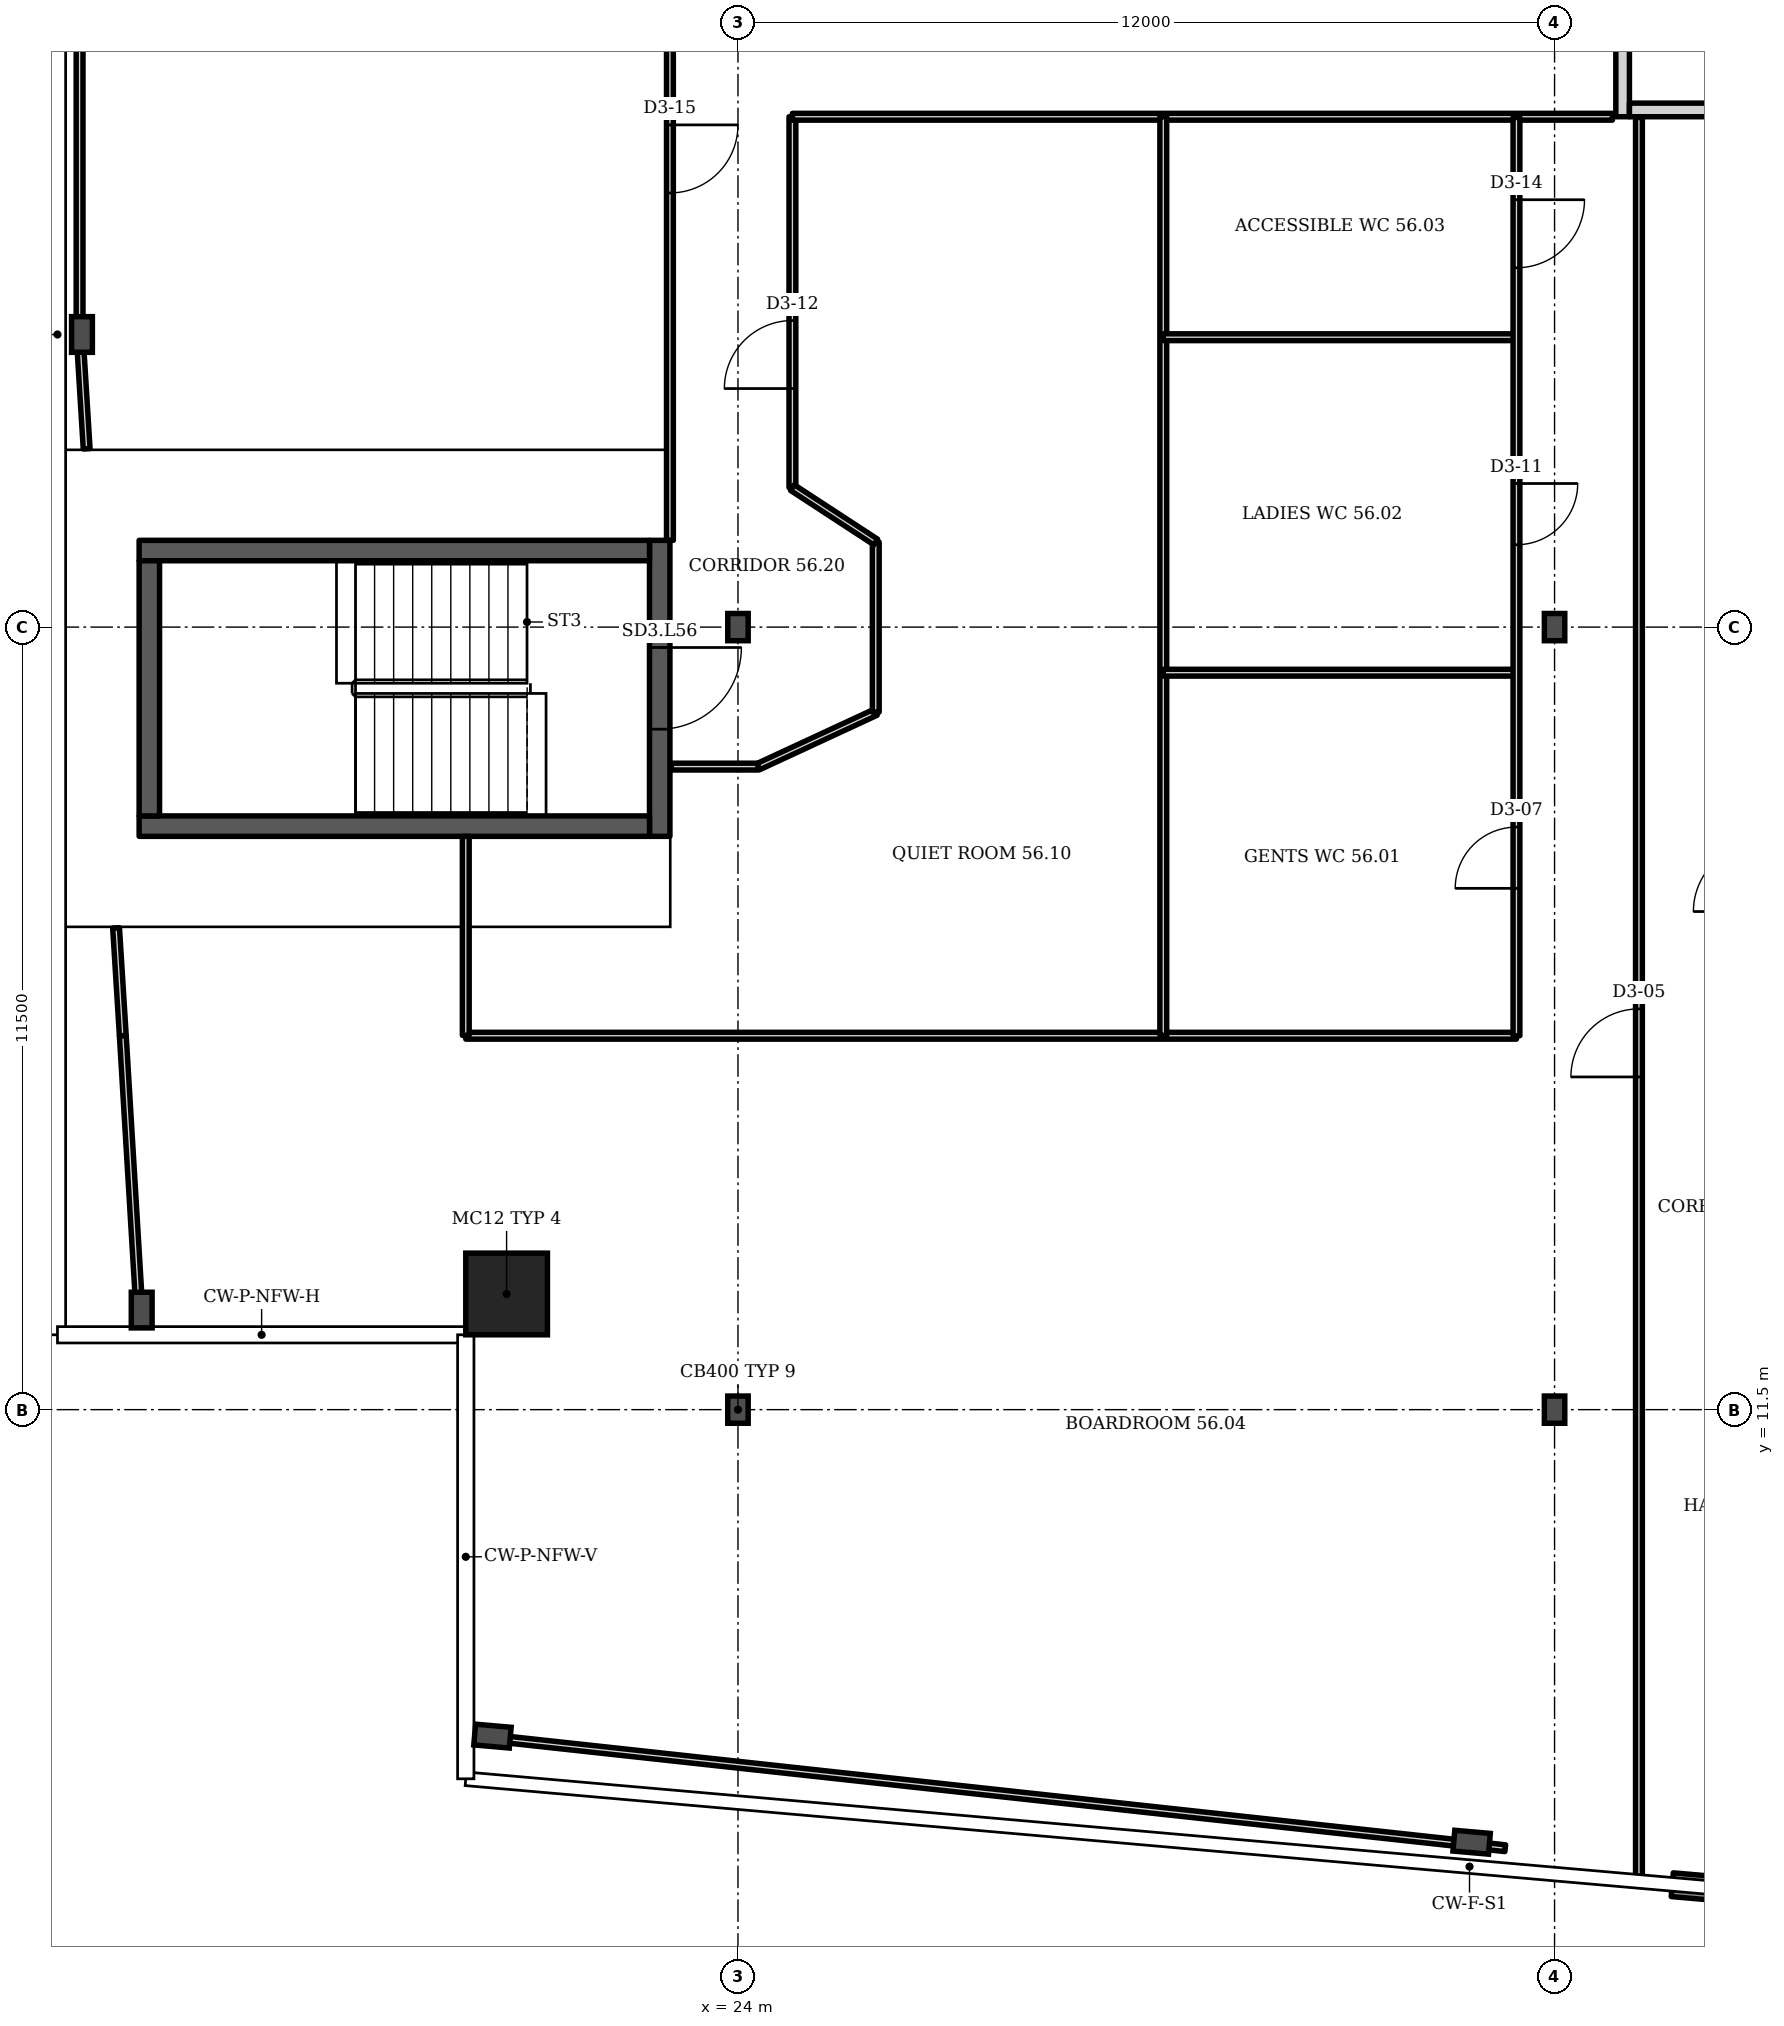
"""IFC4 building model, lengths in metres.
Left out: names, types, materials, properties, quantities, classifications, styles, units other than length and angle.
Written with IfcOpenShell. Run it as: python <this file> out.ifc"""

import sys

from ifc_helpers import new_model, si_unit, direction, frame, frame_2d, origin, origin_2d, place, context, subcontext, project, spatial, rectangle, i_section, extrude, element, fill, save


model = new_model("IFC4")
c1 = context("Model", 3, precision=1e-05, world=origin(), true_north=direction((0.0, 1.0)))
c2 = subcontext(c1, "Body", "Model", "MODEL_VIEW")
j1 = project(units=[si_unit("LENGTHUNIT", "METRE"), si_unit("PLANEANGLEUNIT", "RADIAN")], contexts=[c1])
p1 = place(None, origin())
s1 = spatial("IfcSite", under=j1, at=p1, CompositionType="ELEMENT")
p2 = place(p1, origin())
s2 = spatial("IfcBuilding", under=s1, at=p2, CompositionType="ELEMENT")
p3 = place(p2, frame((0.0, 0.0, 225.1)))
s3 = spatial("IfcBuildingStorey", under=s2, at=p3, CompositionType="ELEMENT", Elevation=225.1)
p4 = place(p3, frame((20.6, 13.2, 0.0), z_axis=(0.0, 0.0, 1.0), x_axis=(1.0, 0.0, 0.0)))
e1 = element("IfcColumn", 1, at=p4, inside=s3, PredefinedType="COLUMN", context=c2, shape_type="SweptSolid", body=[
    extrude(rectangle(XDim=1.2, YDim=1.2, at=origin_2d()), origin(), (0.0, 0.0, 1.0), 3.6),
])
for number, where, z_axis, x_axis in (
    (2, (20.392, 6.703, 0.0), (0.0, 0.0, 1.0), (-0.087, -0.996, 0.0)),
    (3, (34.781, 5.143, 0.0), (0.0, 0.0, 1.0), (-0.087, -0.996, 0.0)),
    (4, (14.36, 27.3, 0.0), (0.0, 0.0, 1.0), (-1.0, 0.0, 0.0)),
    (5, (15.238, 12.963, 0.0), (0.0, 0.0, 1.0), (-1.0, 0.0, 0.0)),
):
    element("IfcColumn", number, at=place(p3, frame(where, z_axis=z_axis, x_axis=x_axis)), inside=s3, PredefinedType="COLUMN", context=c2, shape_type="SweptSolid", body=[
        extrude(i_section(OverallWidth=0.306, OverallDepth=0.524, WebThickness=0.021, FlangeThickness=0.04, FilletRadius=0.027, at=origin_2d()), origin(), (0.0, 0.0, 1.0), 3.6),
    ])
for number, where, z_axis, x_axis in (
    (6, (24.0, 11.5, 0.0), (0.0, 0.0, 1.0), (1.0, 0.0, 0.0)),
    (7, (36.0, 11.5, 0.0), (0.0, 0.0, 1.0), (1.0, 0.0, 0.0)),
    (8, (24.0, 23.0, 0.0), (0.0, 0.0, 1.0), (1.0, 0.0, 0.0)),
    (9, (36.0, 23.0, 0.0), (0.0, 0.0, 1.0), (1.0, 0.0, 0.0)),
):
    element("IfcColumn", number, at=place(p3, frame(where, z_axis=z_axis, x_axis=x_axis)), inside=s3, PredefinedType="COLUMN", context=c2, shape_type="SweptSolid", body=[
        extrude(i_section(OverallWidth=0.3, OverallDepth=0.4, WebThickness=0.013, FlangeThickness=0.024, FilletRadius=0.027, at=origin_2d()), origin(), (0.0, 0.0, 1.0), 3.6),
    ])
p5 = place(p3, frame((37.729, 4.519, 0.0), z_axis=(0.0, 0.0, 1.0), x_axis=(0.99619, -0.087167, 0.0)))
e10 = element("IfcWall", 10, at=p5, inside=s3, PredefinedType="SOLIDWALL", context=c2, shape_type="SweptSolid", body=[
    extrude(rectangle(XDim=11.831, YDim=0.35, at=frame_2d((5.915, 0.0))), origin(), (0.0, 0.0, 1.0), 1.0),
])
p6 = place(p3, frame((37.0, 30.5, 0.0), z_axis=(0.0, 0.0, 1.0), x_axis=(0.0, 1.0, 0.0)))
e11 = element("IfcWall", 11, at=p6, inside=s3, PredefinedType="PARTITIONING", context=c2, shape_type="SweptSolid", body=[
    extrude(rectangle(XDim=3.5, YDim=0.2, at=frame_2d((1.75, 0.0))), origin(), (0.0, 0.0, 1.0), 3.2),
])
p7 = place(p6, frame((1.2, 0.0, 0.0)))
e12 = element("IfcOpeningElement", 12, at=p7, cuts=e11, PredefinedType="OPENING", context=c2, shape_type="SweptSolid", body=[
    extrude(rectangle(XDim=1.1, YDim=2.1, at=frame_2d((0.55, 1.05))), frame((0.0, 0.11, 0.0), z_axis=(0.0, -1.0, 0.0), x_axis=(1.0, 0.0, 0.0)), (0.0, 0.0, 1.0), 0.22),
])
p8 = place(p3, frame((37.1, 30.6, 0.0), z_axis=(0.0, 0.0, 1.0), x_axis=(1.0, 0.0, 0.0)))
e13 = element("IfcWall", 13, at=p8, inside=s3, PredefinedType="PARTITIONING", context=c2, shape_type="SweptSolid", body=[
    extrude(rectangle(XDim=2.8, YDim=0.2, at=frame_2d((1.4, 0.0))), origin(), (0.0, 0.0, 1.0), 3.2),
])
p9 = place(p3, frame((22.85, 19.925, 0.0), z_axis=(0.0, 0.0, 1.0), x_axis=(0.0, 1.0, 0.0)))
e14 = element("IfcWall", 14, at=p9, inside=s3, PredefinedType="SHEAR", context=c2, shape_type="SweptSolid", body=[
    extrude(rectangle(XDim=4.35, YDim=0.3, at=frame_2d((2.175, 0.0))), origin(), (0.0, 0.0, 1.0), 3.2),
])
p10 = place(p9, frame((1.575, 0.0, 0.0)))
e15 = element("IfcOpeningElement", 15, at=p10, cuts=e14, PredefinedType="OPENING", context=c2, shape_type="SweptSolid", body=[
    extrude(rectangle(XDim=1.2, YDim=2.1, at=frame_2d((0.6, 1.05))), frame((0.0, 0.16, 0.0), z_axis=(0.0, -1.0, 0.0), x_axis=(1.0, 0.0, 0.0)), (0.0, 0.0, 1.0), 0.32),
])
p11 = place(p3, frame((14.325, 27.3, 0.0), z_axis=(0.0, 0.0, 1.0), x_axis=(0.0, 1.0, 0.0)))
e16 = element("IfcWall", 16, at=p11, inside=s3, PredefinedType="PARTITIONING", context=c2, shape_type="SweptSolid", body=[
    extrude(rectangle(XDim=14.68, YDim=0.1, at=frame_2d((7.34, 0.0))), origin(), (0.0, 0.0, 1.0), 2.58),
])
p12 = place(p3, frame((14.429, 25.62, 0.0), z_axis=(0.0, 0.0, 1.0), x_axis=(-0.061647, 0.998101, 0.0)))
e17 = element("IfcWall", 17, at=p12, inside=s3, PredefinedType="PARTITIONING", context=c2, shape_type="SweptSolid", body=[
    extrude(rectangle(XDim=1.683, YDim=0.1, at=frame_2d((0.842, 0.0))), origin(), (0.0, 0.0, 1.0), 3.2),
])
p13 = place(p3, frame((14.96, 16.995, 0.0), z_axis=(0.0, 0.0, 1.0), x_axis=(-0.062263, 0.998056, 0.0)))
e18 = element("IfcWall", 18, at=p13, inside=s3, PredefinedType="PARTITIONING", context=c2, shape_type="SweptSolid", body=[
    extrude(rectangle(XDim=1.588, YDim=0.1, at=frame_2d((0.794, 0.0))), origin(), (0.0, 0.0, 1.0), 3.2),
])
p14 = place(p3, frame((15.224, 12.62, 0.0), z_axis=(0.0, 0.0, 1.0), x_axis=(-0.060214, 0.998182, 0.0)))
e19 = element("IfcWall", 19, at=p14, inside=s3, PredefinedType="PARTITIONING", context=c2, shape_type="SweptSolid", body=[
    extrude(rectangle(XDim=4.383, YDim=0.1, at=frame_2d((2.191, 0.0))), origin(), (0.0, 0.0, 1.0), 3.2),
])
p15 = place(p3, frame((20.0, 16.995, 0.0), z_axis=(0.0, 0.0, 1.0), x_axis=(1.0, 0.0, 0.0)))
e20 = element("IfcWall", 20, at=p15, inside=s3, PredefinedType="PARTITIONING", context=c2, shape_type="SweptSolid", body=[
    extrude(rectangle(XDim=15.44, YDim=0.1, at=frame_2d((7.72, 0.0))), origin(), (0.0, 0.0, 1.0), 3.2),
])
p16 = place(p3, frame((20.0, 17.0, 0.0), z_axis=(0.0, 0.0, 1.0), x_axis=(0.0, 1.0, 0.0)))
e21 = element("IfcWall", 21, at=p16, inside=s3, PredefinedType="PARTITIONING", context=c2, shape_type="SweptSolid", body=[
    extrude(rectangle(XDim=2.925, YDim=0.1, at=frame_2d((1.462, 0.0))), origin(), (0.0, 0.0, 1.0), 3.2),
])
p17 = place(p3, frame((23.0, 24.275, 0.0), z_axis=(0.0, 0.0, 1.0), x_axis=(0.0, 1.0, 0.0)))
e22 = element("IfcWall", 22, at=p17, inside=s3, PredefinedType="PARTITIONING", context=c2, shape_type="SweptSolid", body=[
    extrude(rectangle(XDim=9.705, YDim=0.1, at=frame_2d((4.853, 0.0))), origin(), (0.0, 0.0, 1.0), 3.2),
])
p18 = place(p17, frame((5.105, 0.0, 0.0)))
e23 = element("IfcOpeningElement", 23, at=p18, cuts=e22, PredefinedType="OPENING", context=c2, shape_type="SweptSolid", body=[
    extrude(rectangle(XDim=1.0, YDim=2.1, at=frame_2d((0.5, 1.05))), frame((0.0, 0.06, 0.0), z_axis=(0.0, -1.0, 0.0), x_axis=(1.0, 0.0, 0.0)), (0.0, 0.0, 1.0), 0.12),
])
p19 = place(p3, frame((23.02, 20.95, 0.0), z_axis=(0.0, 0.0, 1.0), x_axis=(1.0, 0.0, 0.0)))
e24 = element("IfcWall", 24, at=p19, inside=s3, PredefinedType="PARTITIONING", context=c2, shape_type="SweptSolid", body=[
    extrude(rectangle(XDim=1.28, YDim=0.1, at=frame_2d((0.64, 0.0))), origin(), (0.0, 0.0, 1.0), 3.2),
])
p20 = place(p3, frame((24.3, 20.95, 0.0), z_axis=(0.0, 0.0, 1.0), x_axis=(0.907168, 0.420777, 0.0)))
e25 = element("IfcWall", 25, at=p20, inside=s3, PredefinedType="PARTITIONING", context=c2, shape_type="SweptSolid", body=[
    extrude(rectangle(XDim=1.901, YDim=0.1, at=frame_2d((0.951, 0.0))), origin(), (0.0, 0.0, 1.0), 3.2),
])
p21 = place(p3, frame((24.8, 25.05, 0.0), z_axis=(0.0, 0.0, 1.0), x_axis=(0.0, 1.0, 0.0)))
e26 = element("IfcWall", 26, at=p21, inside=s3, PredefinedType="PARTITIONING", context=c2, shape_type="SweptSolid", body=[
    extrude(rectangle(XDim=5.45, YDim=0.1, at=frame_2d((2.725, 0.0))), origin(), (0.0, 0.0, 1.0), 3.2),
])
p22 = place(p21, frame((1.455, 0.0, 0.0)))
e27 = element("IfcOpeningElement", 27, at=p22, cuts=e26, PredefinedType="OPENING", context=c2, shape_type="SweptSolid", body=[
    extrude(rectangle(XDim=1.0, YDim=2.1, at=frame_2d((0.5, 1.05))), frame((0.0, 0.06, 0.0), z_axis=(0.0, -1.0, 0.0), x_axis=(1.0, 0.0, 0.0)), (0.0, 0.0, 1.0), 0.12),
])
p23 = place(p3, frame((24.8, 30.5, 0.0), z_axis=(0.0, 0.0, 1.0), x_axis=(1.0, 0.0, 0.0)))
e28 = element("IfcWall", 28, at=p23, inside=s3, PredefinedType="PARTITIONING", context=c2, shape_type="SweptSolid", body=[
    extrude(rectangle(XDim=12.05, YDim=0.1, at=frame_2d((6.025, 0.0))), origin(), (0.0, 0.0, 1.0), 3.2),
])
p24 = place(p3, frame((26.025, 21.75, 0.0), z_axis=(0.0, 0.0, 1.0), x_axis=(0.0, 1.0, 0.0)))
e29 = element("IfcWall", 29, at=p24, inside=s3, PredefinedType="PARTITIONING", context=c2, shape_type="SweptSolid", body=[
    extrude(rectangle(XDim=2.5, YDim=0.1, at=frame_2d((1.25, 0.0))), origin(), (0.0, 0.0, 1.0), 3.2),
])
p25 = place(p3, frame((26.025, 24.25, 0.0), z_axis=(0.0, 0.0, 1.0), x_axis=(-0.837222, 0.546856, 0.0)))
e30 = element("IfcWall", 30, at=p25, inside=s3, PredefinedType="PARTITIONING", context=c2, shape_type="SweptSolid", body=[
    extrude(rectangle(XDim=1.463, YDim=0.1, at=frame_2d((0.731, 0.0))), origin(), (0.0, 0.0, 1.0), 3.2),
])
p26 = place(p3, frame((30.25, 17.0, 0.0), z_axis=(0.0, 0.0, 1.0), x_axis=(0.0, 1.0, 0.0)))
e31 = element("IfcWall", 31, at=p26, inside=s3, PredefinedType="PARTITIONING", context=c2, shape_type="SweptSolid", body=[
    extrude(rectangle(XDim=13.5, YDim=0.1, at=frame_2d((6.75, 0.0))), origin(), (0.0, 0.0, 1.0), 3.2),
])
for number, where, z_axis, x_axis in (
    (32, (30.25, 22.33, 0.0), (0.0, 0.0, 1.0), (1.0, 0.0, 0.0)),
    (33, (30.25, 27.26, 0.0), (0.0, 0.0, 1.0), (1.0, 0.0, 0.0)),
):
    element("IfcWall", number, at=place(p3, frame(where, z_axis=z_axis, x_axis=x_axis)), inside=s3, PredefinedType="PARTITIONING", context=c2, shape_type="SweptSolid", body=[
        extrude(rectangle(XDim=5.19, YDim=0.1, at=frame_2d((2.595, 0.0))), origin(), (0.0, 0.0, 1.0), 3.2),
    ])
p27 = place(p3, frame((35.275, 5.055, 0.0), z_axis=(0.0, 0.0, 1.0), x_axis=(-0.994128, 0.108228, 0.0)))
e34 = element("IfcWall", 34, at=p27, inside=s3, PredefinedType="PARTITIONING", context=c2, shape_type="SweptSolid", body=[
    extrude(rectangle(XDim=15.335, YDim=0.1, at=frame_2d((7.667, 0.0))), origin(), (0.0, 0.0, 1.0), 2.58),
])
p28 = place(p3, frame((35.44, 16.995, 0.0), z_axis=(0.0, 0.0, 1.0), x_axis=(0.0, 1.0, 0.0)))
e35 = element("IfcWall", 35, at=p28, inside=s3, PredefinedType="PARTITIONING", context=c2, shape_type="SweptSolid", body=[
    extrude(rectangle(XDim=13.495, YDim=0.1, at=frame_2d((6.748, 0.0))), origin(), (0.0, 0.0, 1.0), 3.2),
])
p29 = place(p28, frame((2.166, 0.0, 0.0)))
e36 = element("IfcOpeningElement", 36, at=p29, cuts=e35, PredefinedType="OPENING", context=c2, shape_type="SweptSolid", body=[
    extrude(rectangle(XDim=0.9, YDim=2.1, at=frame_2d((0.45, 1.05))), frame((0.0, 0.06, 0.0), z_axis=(0.0, -1.0, 0.0), x_axis=(1.0, 0.0, 0.0)), (0.0, 0.0, 1.0), 0.12),
])
p30 = place(p28, frame((7.215, 0.0, 0.0)))
e37 = element("IfcOpeningElement", 37, at=p30, cuts=e35, PredefinedType="OPENING", context=c2, shape_type="SweptSolid", body=[
    extrude(rectangle(XDim=0.9, YDim=2.1, at=frame_2d((0.45, 1.05))), frame((0.0, 0.06, 0.0), z_axis=(0.0, -1.0, 0.0), x_axis=(1.0, 0.0, 0.0)), (0.0, 0.0, 1.0), 0.12),
])
p31 = place(p28, frame((11.285, 0.0, 0.0)))
e38 = element("IfcOpeningElement", 38, at=p31, cuts=e35, PredefinedType="OPENING", context=c2, shape_type="SweptSolid", body=[
    extrude(rectangle(XDim=1.0, YDim=2.1, at=frame_2d((0.5, 1.05))), frame((0.0, 0.06, 0.0), z_axis=(0.0, -1.0, 0.0), x_axis=(1.0, 0.0, 0.0)), (0.0, 0.0, 1.0), 0.12),
])
p32 = place(p3, frame((37.24, 4.587, 0.0), z_axis=(0.0, 0.0, 1.0), x_axis=(0.0, 1.0, 0.0)))
e39 = element("IfcWall", 39, at=p32, inside=s3, PredefinedType="PARTITIONING", context=c2, shape_type="SweptSolid", body=[
    extrude(rectangle(XDim=25.903, YDim=0.1, at=frame_2d((12.952, 0.0))), origin(), (0.0, 0.0, 1.0), 2.58),
])
p33 = place(p32, frame((11.802, 0.0, 0.0)))
e40 = element("IfcOpeningElement", 40, at=p33, cuts=e39, PredefinedType="OPENING", context=c2, shape_type="SweptSolid", body=[
    extrude(rectangle(XDim=1.0, YDim=2.1, at=frame_2d((0.5, 1.05))), frame((0.0, 0.06, 0.0), z_axis=(0.0, -1.0, 0.0), x_axis=(1.0, 0.0, 0.0)), (0.0, 0.0, 1.0), 0.12),
])
for number, where, z_axis, x_axis in (
    (41, (15.2, 20.075, 0.0), (0.0, 0.0, 1.0), (1.0, 0.0, 0.0)),
    (42, (15.2, 24.125, 0.0), (0.0, 0.0, 1.0), (1.0, 0.0, 0.0)),
):
    element("IfcWall", number, at=place(p3, frame(where, z_axis=z_axis, x_axis=x_axis)), inside=s3, PredefinedType="SHEAR", context=c2, shape_type="SweptSolid", body=[
        extrude(rectangle(XDim=7.5, YDim=0.3, at=frame_2d((3.75, 0.0))), origin(), (0.0, 0.0, 1.0), 3.2),
    ])
p34 = place(p3, frame((15.35, 20.225, 0.0), z_axis=(0.0, 0.0, 1.0), x_axis=(0.0, 1.0, 0.0)))
e43 = element("IfcWall", 43, at=p34, inside=s3, PredefinedType="SHEAR", context=c2, shape_type="SweptSolid", body=[
    extrude(rectangle(XDim=3.75, YDim=0.3, at=frame_2d((1.875, 0.0))), origin(), (0.0, 0.0, 1.0), 3.2),
])
p35 = place(p10, origin())
e44 = element("IfcDoor", 44, at=p35, inside=s3, OperationType="SINGLE_SWING_RIGHT", PredefinedType="DOOR", context=c2, shape_type="SweptSolid", body=[
    extrude(rectangle(XDim=1.2, YDim=2.1, at=frame_2d((0.6, 1.05))), frame((0.0, 0.025, 0.0), z_axis=(0.0, -1.0, 0.0), x_axis=(1.0, 0.0, 0.0)), (0.0, 0.0, 1.0), 0.05),
])
fill(e15, e44)
p36 = place(p33, origin())
e45 = element("IfcDoor", 45, at=p36, inside=s3, OperationType="SINGLE_SWING_LEFT", PredefinedType="DOOR", context=c2, shape_type="SweptSolid", body=[
    extrude(rectangle(XDim=1.0, YDim=2.1, at=frame_2d((0.5, 1.05))), frame((0.0, 0.025, 0.0), z_axis=(0.0, -1.0, 0.0), x_axis=(1.0, 0.0, 0.0)), (0.0, 0.0, 1.0), 0.05),
])
fill(e40, e45)
p37 = place(p29, origin())
e46 = element("IfcDoor", 46, at=p37, inside=s3, OperationType="SINGLE_SWING_LEFT", PredefinedType="DOOR", context=c2, shape_type="SweptSolid", body=[
    extrude(rectangle(XDim=0.9, YDim=2.1, at=frame_2d((0.45, 1.05))), frame((0.0, 0.025, 0.0), z_axis=(0.0, -1.0, 0.0), x_axis=(1.0, 0.0, 0.0)), (0.0, 0.0, 1.0), 0.05),
])
fill(e36, e46)
p38 = place(p30, origin())
e47 = element("IfcDoor", 47, at=p38, inside=s3, OperationType="SINGLE_SWING_RIGHT", PredefinedType="DOOR", context=c2, shape_type="SweptSolid", body=[
    extrude(rectangle(XDim=0.9, YDim=2.1, at=frame_2d((0.45, 1.05))), frame((0.0, 0.025, 0.0), z_axis=(0.0, -1.0, 0.0), x_axis=(1.0, 0.0, 0.0)), (0.0, 0.0, 1.0), 0.05),
])
fill(e37, e47)
p39 = place(p22, origin())
e48 = element("IfcDoor", 48, at=p39, inside=s3, OperationType="SINGLE_SWING_LEFT", PredefinedType="DOOR", context=c2, shape_type="SweptSolid", body=[
    extrude(rectangle(XDim=1.0, YDim=2.1, at=frame_2d((0.5, 1.05))), frame((0.0, 0.025, 0.0), z_axis=(0.0, -1.0, 0.0), x_axis=(1.0, 0.0, 0.0)), (0.0, 0.0, 1.0), 0.05),
])
fill(e27, e48)
p40 = place(p31, origin())
e49 = element("IfcDoor", 49, at=p40, inside=s3, OperationType="SINGLE_SWING_RIGHT", PredefinedType="DOOR", context=c2, shape_type="SweptSolid", body=[
    extrude(rectangle(XDim=1.0, YDim=2.1, at=frame_2d((0.5, 1.05))), frame((0.0, 0.025, 0.0), z_axis=(0.0, -1.0, 0.0), x_axis=(1.0, 0.0, 0.0)), (0.0, 0.0, 1.0), 0.05),
])
fill(e38, e49)
p41 = place(p18, origin())
e50 = element("IfcDoor", 50, at=p41, inside=s3, OperationType="SINGLE_SWING_RIGHT", PredefinedType="DOOR", context=c2, shape_type="SweptSolid", body=[
    extrude(rectangle(XDim=1.0, YDim=2.1, at=frame_2d((0.5, 1.05))), frame((0.0, 0.025, 0.0), z_axis=(0.0, -1.0, 0.0), x_axis=(1.0, 0.0, 0.0)), (0.0, 0.0, 1.0), 0.05),
])
fill(e23, e50)
save(model, sys.argv[1])
